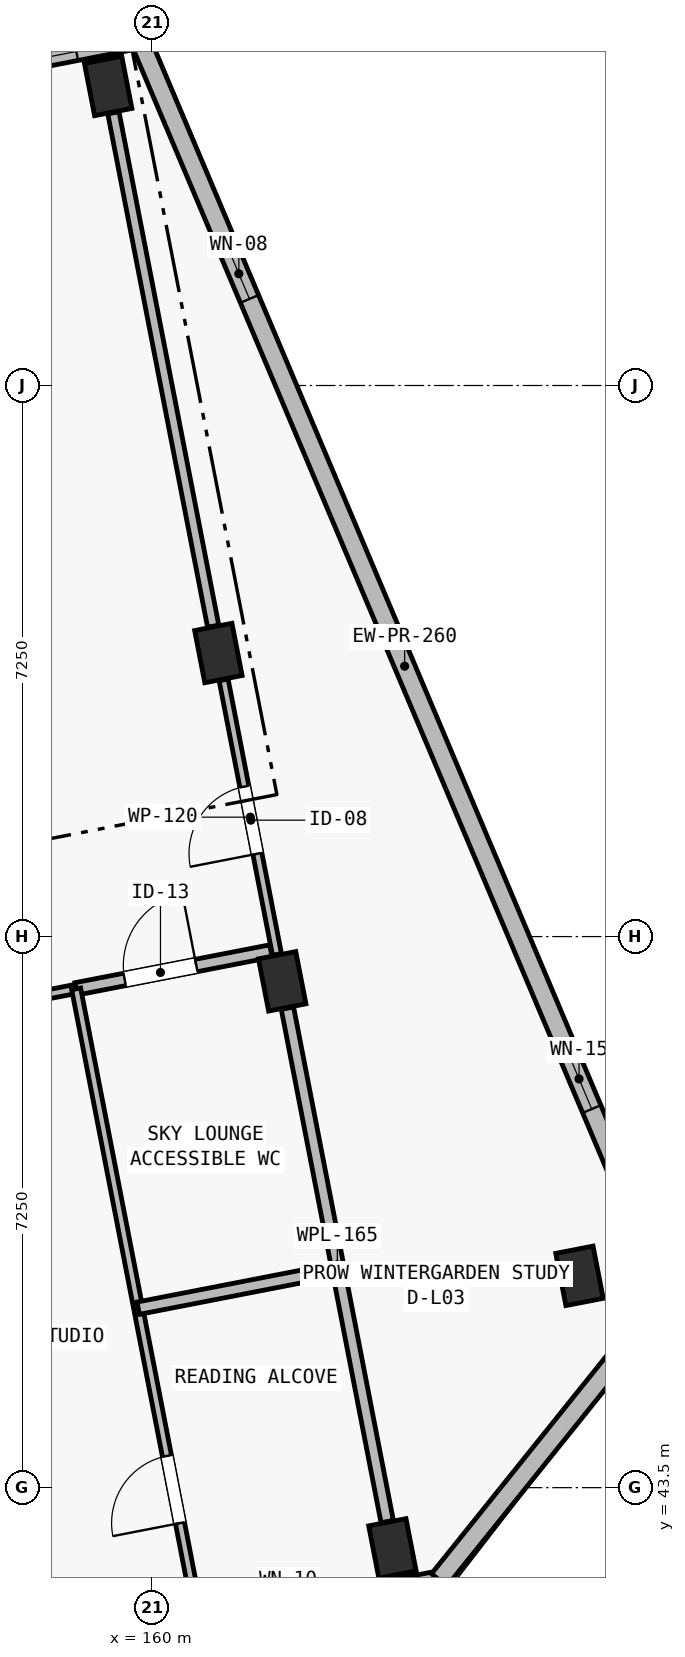
"""IFC4 building model, lengths in metres.
Left out: names, types, materials, properties, quantities, classifications, styles, units other than length and angle.
Written with IfcOpenShell. Run it as: python <this file> out.ifc"""

import sys

from ifc_helpers import new_model, si_unit, direction, frame, frame_2d, origin, origin_2d, place, context, subcontext, project, spatial, rectangle, extrude, element, fill, save


model = new_model("IFC4")
c1 = context("Model", 3, precision=1e-05, world=origin(), true_north=direction((0.0, 1.0)))
c2 = subcontext(c1, "Body", "Model", "MODEL_VIEW")
j1 = project(units=[si_unit("LENGTHUNIT", "METRE"), si_unit("PLANEANGLEUNIT", "RADIAN")], contexts=[c1])
p1 = place(None, origin())
s1 = spatial("IfcSite", under=j1, at=p1, CompositionType="ELEMENT")
p2 = place(p1, origin())
s2 = spatial("IfcBuilding", under=s1, at=p2, CompositionType="ELEMENT")
p3 = place(p2, frame((0.0, 0.0, 11.65)))
s3 = spatial("IfcBuildingStorey", under=s2, at=p3, CompositionType="ELEMENT", Elevation=11.65)
for number, where, z_axis, x_axis in (
    (1, (163.162, 42.701, 0.0), (0.0, 0.0, 1.0), (0.982, 0.191, 0.0)),
    (2, (161.712, 50.161, 0.0), (0.0, 0.0, 1.0), (0.982, 0.191, 0.0)),
    (3, (160.873, 54.48, 0.0), (0.0, 0.0, 1.0), (0.982, 0.191, 0.0)),
    (4, (159.422, 61.941, 0.0), (0.0, 0.0, 1.0), (0.982, 0.191, 0.0)),
    (5, (165.623, 46.286, 0.0), (0.0, 0.0, 1.0), (0.982, 0.191, 0.0)),
):
    element("IfcColumn", number, at=place(p3, frame(where, z_axis=z_axis, x_axis=x_axis)), inside=s3, PredefinedType="COLUMN", context=c2, shape_type="SweptSolid", body=[
        extrude(rectangle(XDim=0.5, YDim=0.7, at=origin_2d()), origin(), (0.0, 0.0, 1.0), 3.25),
    ])
p4 = place(p3, frame((163.778, 42.286, 0.0), z_axis=(0.0, 0.0, 1.0), x_axis=(-0.981628367112, -0.190802905848, 0.0)))
e6 = element("IfcWall", 6, at=p4, inside=s3, PredefinedType="SOLIDWALL", context=c2, shape_type="SweptSolid", body=[
    extrude(rectangle(XDim=8.125, YDim=0.24, at=frame_2d((4.062, 0.0))), origin(), (0.0, 0.0, 1.0), 3.0),
])
p5 = place(p4, frame((1.646, 0.0, 0.52)))
e7 = element("IfcOpeningElement", 7, at=p5, cuts=e6, PredefinedType="OPENING", context=c2, shape_type="SweptSolid", body=[
    extrude(rectangle(XDim=0.76, YDim=2.34, at=frame_2d((0.38, 1.17))), frame((0.0, 0.135, 0.0), z_axis=(0.0, -1.0, 0.0), x_axis=(1.0, 0.0, 0.0)), (0.0, 0.0, 1.0), 0.27),
])
p6 = place(p4, frame((6.219, 0.0, 0.52)))
e8 = element("IfcOpeningElement", 8, at=p6, cuts=e6, PredefinedType="OPENING", context=c2, shape_type="SweptSolid", body=[
    extrude(rectangle(XDim=0.82, YDim=2.18, at=frame_2d((0.41, 1.09))), frame((0.0, 0.135, 0.0), z_axis=(0.0, -1.0, 0.0), x_axis=(1.0, 0.0, 0.0)), (0.0, 0.0, 1.0), 0.27),
])
p7 = place(p3, frame((151.862, 61.006, 0.0), z_axis=(0.0, 0.0, 1.0), x_axis=(0.981627273155, 0.190808533872, 0.0)))
e9 = element("IfcWall", 9, at=p7, inside=s3, PredefinedType="SOLIDWALL", context=c2, shape_type="SweptSolid", body=[
    extrude(rectangle(XDim=8.125, YDim=0.24, at=frame_2d((4.062, 0.0))), origin(), (0.0, 0.0, 1.0), 3.0),
])
p8 = place(p7, frame((6.525, 0.0, 0.45)))
e10 = element("IfcOpeningElement", 10, at=p8, cuts=e9, PredefinedType="OPENING", context=c2, shape_type="SweptSolid", body=[
    extrude(rectangle(XDim=0.75, YDim=2.32, at=frame_2d((0.375, 1.16))), frame((0.0, 0.135, 0.0), z_axis=(0.0, -1.0, 0.0), x_axis=(1.0, 0.0, 0.0)), (0.0, 0.0, 1.0), 0.27),
])
p9 = place(p3, frame((159.837, 62.556, 0.0), z_axis=(0.0, 0.0, 1.0), x_axis=(0.389225507936, -0.921142499276, 0.0)))
e11 = element("IfcWall", 11, at=p9, inside=s3, PredefinedType="SOLIDWALL", context=c2, shape_type="SweptSolid", body=[
    extrude(rectangle(XDim=17.91, YDim=0.26, at=frame_2d((8.955, 0.0))), origin(), (0.0, 0.0, 1.0), 3.0),
])
p10 = place(p9, frame((2.99, 0.0, 0.52)))
e12 = element("IfcOpeningElement", 12, at=p10, cuts=e11, PredefinedType="OPENING", context=c2, shape_type="SweptSolid", body=[
    extrude(rectangle(XDim=0.72, YDim=2.16, at=frame_2d((0.36, 1.08))), frame((0.0, 0.145, 0.0), z_axis=(0.0, -1.0, 0.0), x_axis=(1.0, 0.0, 0.0)), (0.0, 0.0, 1.0), 0.29),
])
p11 = place(p9, frame((14.42, 0.0, 0.45)))
e13 = element("IfcOpeningElement", 13, at=p11, cuts=e11, PredefinedType="OPENING", context=c2, shape_type="SweptSolid", body=[
    extrude(rectangle(XDim=0.86, YDim=2.36, at=frame_2d((0.43, 1.18))), frame((0.0, 0.145, 0.0), z_axis=(0.0, -1.0, 0.0), x_axis=(1.0, 0.0, 0.0)), (0.0, 0.0, 1.0), 0.29),
])
p12 = place(p3, frame((166.809, 46.058, 0.0), z_axis=(0.0, 0.0, 1.0), x_axis=(-0.626281072923, -0.779597343312, 0.0)))
e14 = element("IfcWall", 14, at=p12, inside=s3, PredefinedType="SOLIDWALL", context=c2, shape_type="SweptSolid", body=[
    extrude(rectangle(XDim=4.839, YDim=0.26, at=frame_2d((2.42, 0.0))), origin(), (0.0, 0.0, 1.0), 3.0),
])
p13 = place(p3, frame((161.643, 50.515, 0.0), z_axis=(0.0, 0.0, 1.0), x_axis=(-0.190805731561, 0.981627817864, 0.0)))
e15 = element("IfcWall", 15, at=p13, inside=s3, PredefinedType="PARTITIONING", context=c2, shape_type="SweptSolid", body=[
    extrude(rectangle(XDim=3.68, YDim=0.12, at=frame_2d((1.84, 0.0))), origin(), (0.0, 0.0, 1.0), 2.5),
])
p14 = place(p13, frame((1.35, 0.0, 0.0)))
e16 = element("IfcOpeningElement", 16, at=p14, cuts=e15, PredefinedType="OPENING", context=c2, shape_type="SweptSolid", body=[
    extrude(rectangle(XDim=0.9, YDim=2.1, at=frame_2d((0.45, 1.05))), frame((0.0, 0.075, 0.0), z_axis=(0.0, -1.0, 0.0), x_axis=(1.0, 0.0, 0.0)), (0.0, 0.0, 1.0), 0.15),
])
p15 = place(p3, frame((160.804, 54.834, 0.0), z_axis=(0.0, 0.0, 1.0), x_axis=(-0.190804123115, 0.981628130507, 0.0)))
e17 = element("IfcWall", 17, at=p15, inside=s3, PredefinedType="PARTITIONING", context=c2, shape_type="SweptSolid", body=[
    extrude(rectangle(XDim=6.88, YDim=0.15, at=frame_2d((3.44, 0.0))), origin(), (0.0, 0.0, 1.0), 2.5),
])
p16 = place(p3, frame((163.094, 43.054, 0.0), z_axis=(0.0, 0.0, 1.0), x_axis=(-0.190804123115, 0.981628130507, 0.0)))
e18 = element("IfcWall", 18, at=p16, inside=s3, PredefinedType="PLUMBINGWALL", context=c2, shape_type="SweptSolid", body=[
    extrude(rectangle(XDim=6.88, YDim=0.165, at=frame_2d((3.44, 0.0))), origin(), (0.0, 0.0, 1.0), 2.5),
])
p17 = place(p3, frame((154.427, 49.173, 0.0), z_axis=(0.0, 0.0, 1.0), x_axis=(0.981628202514, 0.190803752658, 0.0)))
e19 = element("IfcWall", 19, at=p17, inside=s3, PredefinedType="PARTITIONING", context=c2, shape_type="SweptSolid", body=[
    extrude(rectangle(XDim=4.66, YDim=0.12, at=frame_2d((2.33, 0.0))), origin(), (0.0, 0.0, 1.0), 2.97),
])
p18 = place(p17, frame((1.15, 0.0, 0.0)))
e20 = element("IfcOpeningElement", 20, at=p18, cuts=e19, PredefinedType="OPENING", context=c2, shape_type="SweptSolid", body=[
    extrude(rectangle(XDim=1.15, YDim=2.15, at=frame_2d((0.575, 1.075))), frame((0.0, 0.075, 0.0), z_axis=(0.0, -1.0, 0.0), x_axis=(1.0, 0.0, 0.0)), (0.0, 0.0, 1.0), 0.15),
])
p19 = place(p3, frame((159.001, 50.062, 0.0), z_axis=(0.0, 0.0, 1.0), x_axis=(0.981624151626, 0.190824592083, 0.0)))
e21 = element("IfcWall", 21, at=p19, inside=s3, PredefinedType="PLUMBINGWALL", context=c2, shape_type="SweptSolid", body=[
    extrude(rectangle(XDim=2.61, YDim=0.165, at=frame_2d((1.305, 0.0))), origin(), (0.0, 0.0, 1.0), 2.97),
])
p20 = place(p19, frame((0.65, 0.0, 0.0)))
e22 = element("IfcOpeningElement", 22, at=p20, cuts=e21, PredefinedType="OPENING", context=c2, shape_type="SweptSolid", body=[
    extrude(rectangle(XDim=0.96, YDim=2.12, at=frame_2d((0.48, 1.06))), frame((0.0, 0.097, 0.0), z_axis=(0.0, -1.0, 0.0), x_axis=(1.0, 0.0, 0.0)), (0.0, 0.0, 1.0), 0.195),
])
p21 = place(p3, frame((160.606, 41.807, 0.0), z_axis=(0.0, 0.0, 1.0), x_axis=(-0.190809830256, 0.981627021163, 0.0)))
e23 = element("IfcWall", 23, at=p21, inside=s3, PredefinedType="PARTITIONING", context=c2, shape_type="SweptSolid", body=[
    extrude(rectangle(XDim=8.41, YDim=0.12, at=frame_2d((4.205, 0.0))), origin(), (0.0, 0.0, 1.0), 2.97),
])
p22 = place(p21, frame((1.25, 0.0, 0.0)))
e24 = element("IfcOpeningElement", 24, at=p22, cuts=e23, PredefinedType="OPENING", context=c2, shape_type="SweptSolid", body=[
    extrude(rectangle(XDim=0.9, YDim=2.1, at=frame_2d((0.45, 1.05))), frame((0.0, 0.075, 0.0), z_axis=(0.0, -1.0, 0.0), x_axis=(1.0, 0.0, 0.0)), (0.0, 0.0, 1.0), 0.15),
])
p23 = place(p3, frame((159.818, 45.861, 0.0), z_axis=(0.0, 0.0, 1.0), x_axis=(0.981628634101, 0.19080153226, 0.0)))
e25 = element("IfcWall", 25, at=p23, inside=s3, PredefinedType="PLUMBINGWALL", context=c2, shape_type="SweptSolid", body=[
    extrude(rectangle(XDim=2.59, YDim=0.165, at=frame_2d((1.295, 0.0))), origin(), (0.0, 0.0, 1.0), 2.97),
])
p24 = place(p8, origin())
e26 = element("IfcWindow", 26, at=p24, inside=s3, PartitioningType="SINGLE_PANEL", PredefinedType="WINDOW", context=c2, shape_type="SweptSolid", body=[
    extrude(rectangle(XDim=0.75, YDim=2.32, at=frame_2d((0.375, 1.16))), frame((0.0, 0.03, 0.0), z_axis=(0.0, -1.0, 0.0), x_axis=(1.0, 0.0, 0.0)), (0.0, 0.0, 1.0), 0.06),
])
fill(e10, e26)
p25 = place(p10, origin())
e27 = element("IfcWindow", 27, at=p25, inside=s3, PartitioningType="SINGLE_PANEL", PredefinedType="WINDOW", context=c2, shape_type="SweptSolid", body=[
    extrude(rectangle(XDim=0.72, YDim=2.16, at=frame_2d((0.36, 1.08))), frame((0.0, 0.03, 0.0), z_axis=(0.0, -1.0, 0.0), x_axis=(1.0, 0.0, 0.0)), (0.0, 0.0, 1.0), 0.06),
])
fill(e12, e27)
p26 = place(p11, origin())
e28 = element("IfcWindow", 28, at=p26, inside=s3, PartitioningType="SINGLE_PANEL", PredefinedType="WINDOW", context=c2, shape_type="SweptSolid", body=[
    extrude(rectangle(XDim=0.86, YDim=2.36, at=frame_2d((0.43, 1.18))), frame((0.0, 0.03, 0.0), z_axis=(0.0, -1.0, 0.0), x_axis=(1.0, 0.0, 0.0)), (0.0, 0.0, 1.0), 0.06),
])
fill(e13, e28)
p27 = place(p14, origin())
e29 = element("IfcDoor", 29, at=p27, inside=s3, OperationType="SINGLE_SWING_LEFT", PredefinedType="DOOR", context=c2, shape_type="SweptSolid", body=[
    extrude(rectangle(XDim=0.9, YDim=2.1, at=frame_2d((0.45, 1.05))), frame((0.0, 0.025, 0.0), z_axis=(0.0, -1.0, 0.0), x_axis=(1.0, 0.0, 0.0)), (0.0, 0.0, 1.0), 0.05),
])
fill(e16, e29)
p28 = place(p20, origin())
e30 = element("IfcDoor", 30, at=p28, inside=s3, OperationType="SINGLE_SWING_RIGHT", PredefinedType="DOOR", context=c2, shape_type="SweptSolid", body=[
    extrude(rectangle(XDim=0.96, YDim=2.12, at=frame_2d((0.48, 1.06))), frame((0.0, 0.025, 0.0), z_axis=(0.0, -1.0, 0.0), x_axis=(1.0, 0.0, 0.0)), (0.0, 0.0, 1.0), 0.05),
])
fill(e22, e30)
p29 = place(p22, origin())
e31 = element("IfcDoor", 31, at=p29, inside=s3, OperationType="SINGLE_SWING_LEFT", PredefinedType="DOOR", context=c2, shape_type="SweptSolid", body=[
    extrude(rectangle(XDim=0.9, YDim=2.1, at=frame_2d((0.45, 1.05))), frame((0.0, 0.025, 0.0), z_axis=(0.0, -1.0, 0.0), x_axis=(1.0, 0.0, 0.0)), (0.0, 0.0, 1.0), 0.05),
])
fill(e24, e31)
save(model, sys.argv[1])
